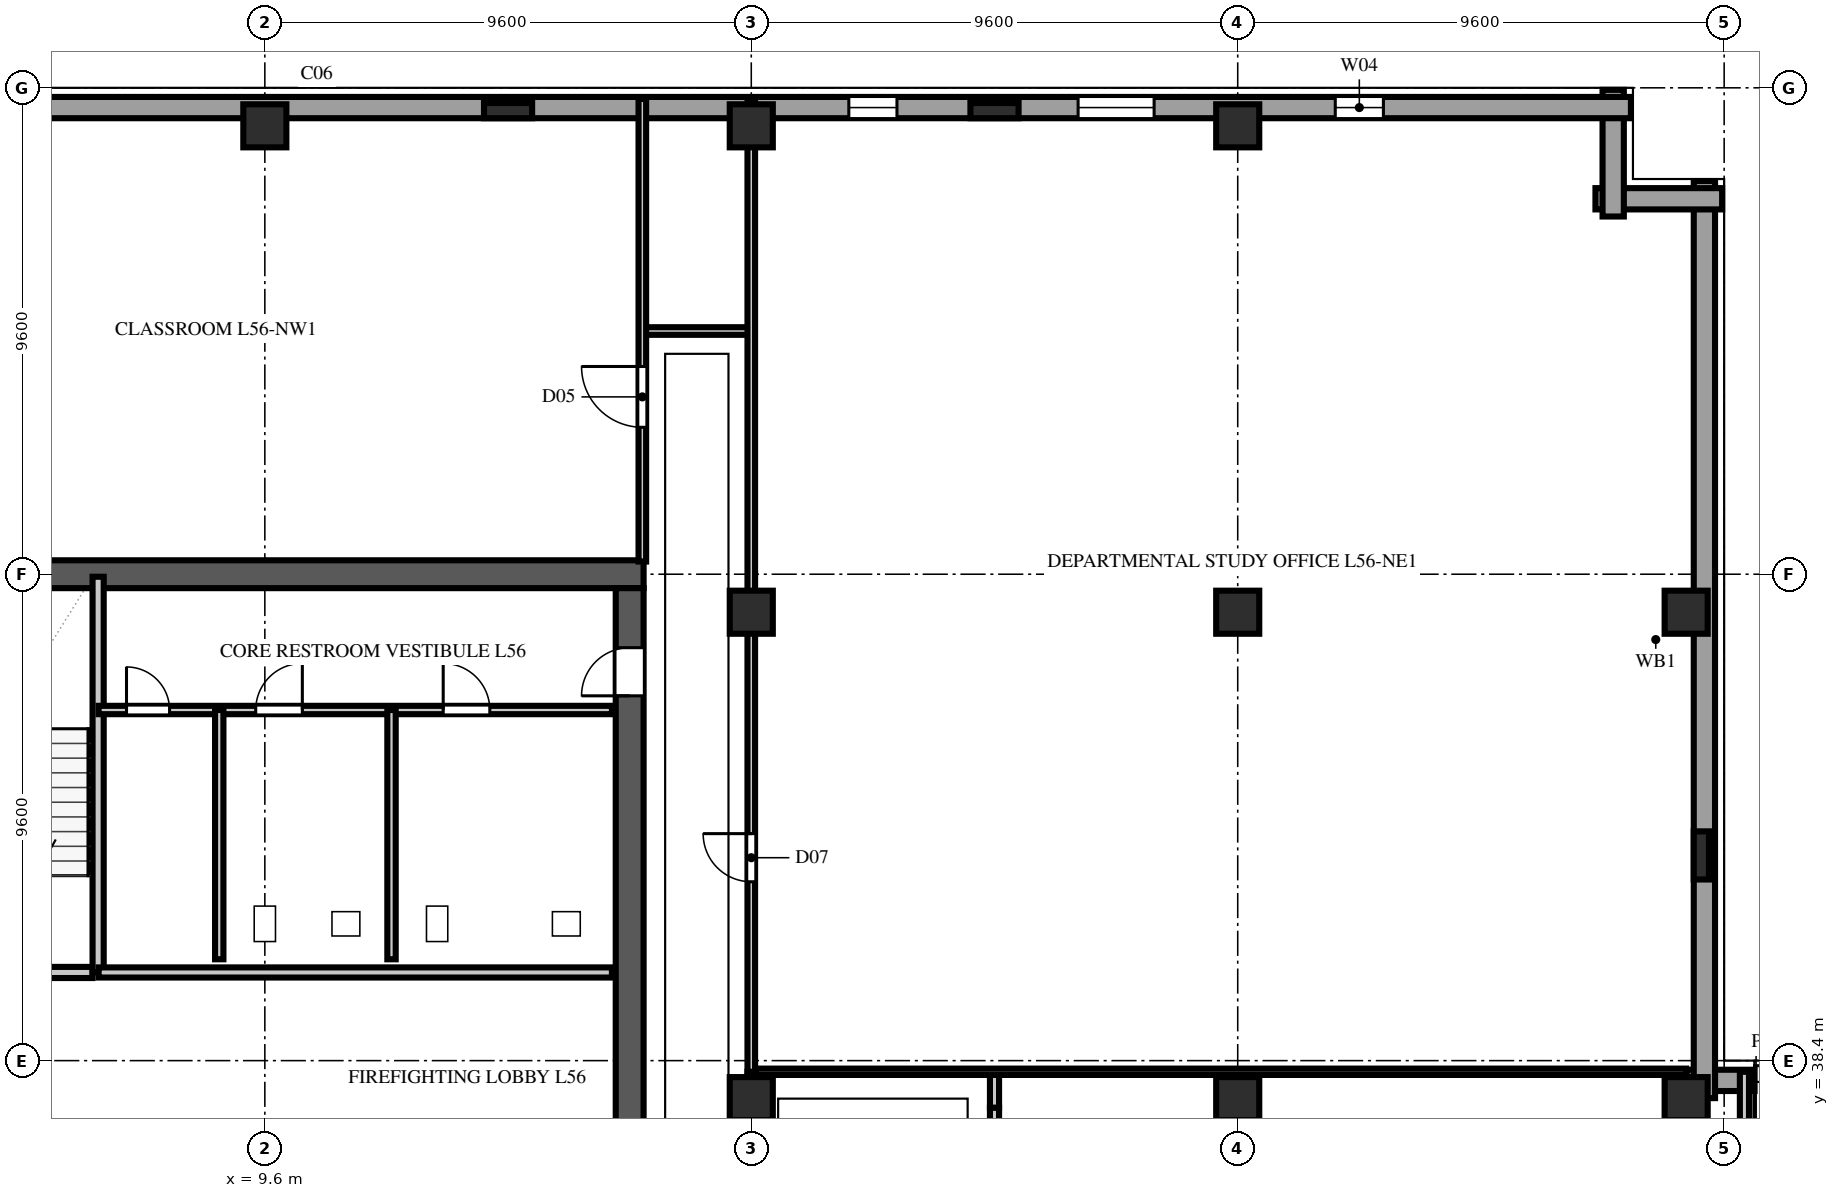
"""IFC4 building model, lengths in metres.
Left out: names, types, materials, properties, quantities, classifications, styles, units other than length and angle.
Written with IfcOpenShell. Run it as: python <this file> out.ifc"""

import sys

from ifc_helpers import new_model, si_unit, direction, frame, frame_2d, origin, origin_2d, place, context, subcontext, project, spatial, rectangle, extrude, element, fill, save


model = new_model("IFC4")
c1 = context("Model", 3, precision=1e-05, world=origin(), true_north=direction((0.0, 1.0)))
c2 = subcontext(c1, "Body", "Model", "MODEL_VIEW")
j1 = project(units=[si_unit("LENGTHUNIT", "METRE"), si_unit("PLANEANGLEUNIT", "RADIAN")], contexts=[c1])
p1 = place(None, origin())
s1 = spatial("IfcSite", under=j1, at=p1, CompositionType="ELEMENT")
p2 = place(p1, origin())
s2 = spatial("IfcBuilding", under=s1, at=p2, CompositionType="ELEMENT")
p3 = place(p2, frame((0.0, 0.0, 221.8)))
s3 = spatial("IfcBuildingStorey", under=s2, at=p3, CompositionType="ELEMENT", Elevation=221.8)
p4 = place(p3, frame((2.475, 48.0, 0.0), z_axis=(0.0, 0.0, 1.0), x_axis=(1.0, 0.0, 0.0)))
e1 = element("IfcWall", 1, at=p4, inside=s3, PredefinedType="SHEAR", context=c2, shape_type="SweptSolid", body=[
    extrude(rectangle(XDim=14.6, YDim=0.55, at=frame_2d((7.3, 0.0))), origin(), (0.0, 0.0, 1.0), 3.54),
])
p5 = place(p3, frame((16.8, 36.4, 0.0), z_axis=(0.0, 0.0, 1.0), x_axis=(0.0, 1.0, 0.0)))
e2 = element("IfcWall", 2, at=p5, inside=s3, PredefinedType="SHEAR", context=c2, shape_type="SweptSolid", body=[
    extrude(rectangle(XDim=11.325, YDim=0.55, at=frame_2d((5.663, 0.0))), origin(), (0.0, 0.0, 1.0), 3.54),
])
p6 = place(p5, frame((9.2, 0.0, 0.0)))
e3 = element("IfcOpeningElement", 3, at=p6, cuts=e2, PredefinedType="OPENING", context=c2, shape_type="SweptSolid", body=[
    extrude(rectangle(XDim=0.95, YDim=2.15, at=frame_2d((0.475, 1.075))), frame((0.0, 0.287, 0.0), z_axis=(0.0, -1.0, 0.0), x_axis=(1.0, 0.0, 0.0)), (0.0, 0.0, 1.0), 0.574),
])
for number, where, z_axis, x_axis in (
    (4, (9.6, 56.85, 0.0), (0.0, 0.0, 1.0), (1.0, 0.0, 0.0)),
    (5, (19.2, 37.65, 0.0), (0.0, 0.0, 1.0), (1.0, 0.0, 0.0)),
    (6, (19.2, 47.25, 0.0), (0.0, 0.0, 1.0), (1.0, 0.0, 0.0)),
    (7, (19.2, 56.85, 0.0), (0.0, 0.0, 1.0), (1.0, 0.0, 0.0)),
    (8, (28.8, 37.65, 0.0), (0.0, 0.0, 1.0), (1.0, 0.0, 0.0)),
    (9, (28.8, 47.25, 0.0), (0.0, 0.0, 1.0), (1.0, 0.0, 0.0)),
    (10, (28.8, 56.85, 0.0), (0.0, 0.0, 1.0), (1.0, 0.0, 0.0)),
    (11, (37.65, 37.65, 0.0), (0.0, 0.0, 1.0), (1.0, 0.0, 0.0)),
    (12, (37.65, 47.25, 0.0), (0.0, 0.0, 1.0), (1.0, 0.0, 0.0)),
):
    element("IfcColumn", number, at=place(p3, frame(where, z_axis=z_axis, x_axis=x_axis)), inside=s3, PredefinedType="COLUMN", context=c2, shape_type="SweptSolid", body=[
        extrude(rectangle(XDim=0.85, YDim=0.85, at=origin_2d()), origin(), (0.0, 0.0, 1.0), 3.8),
    ])
for number, where, z_axis, x_axis in (
    (13, (14.4, 57.15, 0.0), (0.0, 0.0, 1.0), (1.0, 0.0, 0.0)),
    (14, (24.0, 57.15, 0.0), (0.0, 0.0, 1.0), (1.0, 0.0, 0.0)),
    (15, (37.95, 42.45, 0.0), (0.0, 0.0, 1.0), (0.0, 1.0, 0.0)),
):
    element("IfcColumn", number, at=place(p3, frame(where, z_axis=z_axis, x_axis=x_axis)), inside=s3, PredefinedType="PILASTER", context=c2, shape_type="SweptSolid", body=[
        extrude(rectangle(XDim=0.95, YDim=0.3, at=origin_2d()), origin(), (0.0, 0.0, 1.0), 3.8),
    ])
p7 = place(p3, frame((39.0, 38.01, 0.0), z_axis=(0.0, 0.0, 1.0), x_axis=(-1.0, 0.0, 0.0)))
e16 = element("IfcWall", 16, at=p7, inside=s3, PredefinedType="SOLIDWALL", context=c2, shape_type="SweptSolid", body=[
    extrude(rectangle(XDim=1.34, YDim=0.42, at=frame_2d((0.67, 0.0))), origin(), (0.0, 0.0, 1.0), 3.54),
])
p8 = place(p3, frame((38.01, 37.66, 0.0), z_axis=(0.0, 0.0, 1.0), x_axis=(0.0, 1.0, 0.0)))
e17 = element("IfcWall", 17, at=p8, inside=s3, PredefinedType="SOLIDWALL", context=c2, shape_type="SweptSolid", body=[
    extrude(rectangle(XDim=18.1, YDim=0.42, at=frame_2d((9.05, 0.0))), origin(), (0.0, 0.0, 1.0), 3.54),
])
for number, where, z_axis, x_axis in (
    (18, (38.36, 55.41, 0.0), (0.0, 0.0, 1.0), (-1.0, 0.0, 0.0)),
    (19, (36.21, 55.06, 0.0), (0.0, 0.0, 1.0), (0.0, 1.0, 0.0)),
):
    element("IfcWall", number, at=place(p3, frame(where, z_axis=z_axis, x_axis=x_axis)), inside=s3, PredefinedType="SOLIDWALL", context=c2, shape_type="SweptSolid", body=[
        extrude(rectangle(XDim=2.5, YDim=0.42, at=frame_2d((1.25, 0.0))), origin(), (0.0, 0.0, 1.0), 3.54),
    ])
p9 = place(p3, frame((36.56, 57.21, 0.0), z_axis=(0.0, 0.0, 1.0), x_axis=(-1.0, 0.0, 0.0)))
e20 = element("IfcWall", 20, at=p9, inside=s3, PredefinedType="SOLIDWALL", context=c2, shape_type="SweptSolid", body=[
    extrude(rectangle(XDim=34.72, YDim=0.42, at=frame_2d((17.36, 0.0))), origin(), (0.0, 0.0, 1.0), 3.54),
])
p10 = place(p9, frame((4.885, 0.0, 0.9)))
e21 = element("IfcOpeningElement", 21, at=p10, cuts=e20, PredefinedType="OPENING", context=c2, shape_type="SweptSolid", body=[
    extrude(rectangle(XDim=0.95, YDim=1.85, at=frame_2d((0.475, 0.925))), frame((0.0, 0.222, 0.0), z_axis=(0.0, -1.0, 0.0), x_axis=(1.0, 0.0, 0.0)), (0.0, 0.0, 1.0), 0.444),
])
p11 = place(p9, frame((9.41, 0.0, 0.9)))
e22 = element("IfcOpeningElement", 22, at=p11, cuts=e20, PredefinedType="OPENING", context=c2, shape_type="SweptSolid", body=[
    extrude(rectangle(XDim=1.5, YDim=1.85, at=frame_2d((0.75, 0.925))), frame((0.0, 0.222, 0.0), z_axis=(0.0, -1.0, 0.0), x_axis=(1.0, 0.0, 0.0)), (0.0, 0.0, 1.0), 0.444),
])
p12 = place(p9, frame((14.485, 0.0, 0.9)))
e23 = element("IfcOpeningElement", 23, at=p12, cuts=e20, PredefinedType="OPENING", context=c2, shape_type="SweptSolid", body=[
    extrude(rectangle(XDim=0.95, YDim=1.85, at=frame_2d((0.475, 0.925))), frame((0.0, 0.222, 0.0), z_axis=(0.0, -1.0, 0.0), x_axis=(1.0, 0.0, 0.0)), (0.0, 0.0, 1.0), 0.444),
])
p13 = place(p3, frame((2.65, 40.14, 0.0), z_axis=(0.0, 0.0, 1.0), x_axis=(1.0, 0.0, 0.0)))
e24 = element("IfcWall", 24, at=p13, inside=s3, PredefinedType="SOLIDWALL", context=c2, shape_type="SweptSolid", body=[
    extrude(rectangle(XDim=3.55, YDim=0.22, at=frame_2d((1.775, 0.0))), origin(), (0.0, 0.0, 1.0), 3.54),
])
p14 = place(p13, frame((1.2, 0.0, 0.0)))
e25 = element("IfcOpeningElement", 25, at=p14, cuts=e24, PredefinedType="OPENING", context=c2, shape_type="SweptSolid", body=[
    extrude(rectangle(XDim=1.1, YDim=2.2, at=frame_2d((0.55, 1.1))), frame((0.0, 0.122, 0.0), z_axis=(0.0, -1.0, 0.0), x_axis=(1.0, 0.0, 0.0)), (0.0, 0.0, 1.0), 0.244),
])
p15 = place(p3, frame((6.31, 40.14, 0.0), z_axis=(0.0, 0.0, 1.0), x_axis=(0.0, 1.0, 0.0)))
e26 = element("IfcWall", 26, at=p15, inside=s3, PredefinedType="SOLIDWALL", context=c2, shape_type="SweptSolid", body=[
    extrude(rectangle(XDim=7.81, YDim=0.22, at=frame_2d((3.905, 0.0))), origin(), (0.0, 0.0, 1.0), 3.54),
])
p16 = place(p3, frame((6.32, 40.14, 0.0), z_axis=(0.0, 0.0, 1.0), x_axis=(1.0, 0.0, 0.0)))
e27 = element("IfcWall", 27, at=p16, inside=s3, PredefinedType="SOLIDWALL", context=c2, shape_type="SweptSolid", body=[
    extrude(rectangle(XDim=10.13, YDim=0.2, at=frame_2d((5.065, 0.0))), origin(), (0.0, 0.0, 1.0), 3.54),
])
p17 = place(p3, frame((6.32, 45.32, 0.0), z_axis=(0.0, 0.0, 1.0), x_axis=(1.0, 0.0, 0.0)))
e28 = element("IfcWall", 28, at=p17, inside=s3, PredefinedType="PLUMBINGWALL", context=c2, shape_type="SweptSolid", body=[
    extrude(rectangle(XDim=10.13, YDim=0.165, at=frame_2d((5.065, 0.0))), origin(), (0.0, 0.0, 1.0), 3.54),
])
p18 = place(p17, frame((0.55, 0.0, 0.0)))
e29 = element("IfcOpeningElement", 29, at=p18, cuts=e28, PredefinedType="OPENING", context=c2, shape_type="SweptSolid", body=[
    extrude(rectangle(XDim=0.85, YDim=2.1, at=frame_2d((0.425, 1.05))), frame((0.0, 0.094, 0.0), z_axis=(0.0, -1.0, 0.0), x_axis=(1.0, 0.0, 0.0)), (0.0, 0.0, 1.0), 0.189),
])
p19 = place(p17, frame((3.1, 0.0, 0.0)))
e30 = element("IfcOpeningElement", 30, at=p19, cuts=e28, PredefinedType="OPENING", context=c2, shape_type="SweptSolid", body=[
    extrude(rectangle(XDim=0.92, YDim=2.15, at=frame_2d((0.46, 1.075))), frame((0.0, 0.094, 0.0), z_axis=(0.0, -1.0, 0.0), x_axis=(1.0, 0.0, 0.0)), (0.0, 0.0, 1.0), 0.189),
])
p20 = place(p17, frame((6.8, 0.0, 0.0)))
e31 = element("IfcOpeningElement", 31, at=p20, cuts=e28, PredefinedType="OPENING", context=c2, shape_type="SweptSolid", body=[
    extrude(rectangle(XDim=0.92, YDim=2.15, at=frame_2d((0.46, 1.075))), frame((0.0, 0.094, 0.0), z_axis=(0.0, -1.0, 0.0), x_axis=(1.0, 0.0, 0.0)), (0.0, 0.0, 1.0), 0.189),
])
for number, where, z_axis, x_axis in (
    (32, (8.7, 40.4, 0.0), (0.0, 0.0, 1.0), (0.0, 1.0, 0.0)),
    (33, (12.1, 40.4, 0.0), (0.0, 0.0, 1.0), (0.0, 1.0, 0.0)),
):
    element("IfcWall", number, at=place(p3, frame(where, z_axis=z_axis, x_axis=x_axis)), inside=s3, PredefinedType="PLUMBINGWALL", context=c2, shape_type="SweptSolid", body=[
        extrude(rectangle(XDim=4.92, YDim=0.165, at=frame_2d((2.46, 0.0))), origin(), (0.0, 0.0, 1.0), 3.54),
    ])
p21 = place(p3, frame((17.05, 52.8, 0.0), z_axis=(0.0, 0.0, 1.0), x_axis=(1.0, 0.0, 0.0)))
e34 = element("IfcWall", 34, at=p21, inside=s3, PredefinedType="PARTITIONING", context=c2, shape_type="SweptSolid", body=[
    extrude(rectangle(XDim=2.15, YDim=0.15, at=frame_2d((1.075, 0.0))), origin(), (0.0, 0.0, 1.0), 3.54),
])
p22 = place(p3, frame((24.0, 28.978, 0.0), z_axis=(0.0, 0.0, 1.0), x_axis=(0.0, 1.0, 0.0)))
e35 = element("IfcWall", 35, at=p22, inside=s3, PredefinedType="PARTITIONING", context=c2, shape_type="SweptSolid", body=[
    extrude(rectangle(XDim=8.495, YDim=0.18, at=frame_2d((4.248, 0.0))), origin(), (0.0, 0.0, 1.0), 2.996),
])
p23 = place(p3, frame((24.0, 37.472, 0.0), z_axis=(0.0, 0.0, 1.0), x_axis=(0.0, 1.0, 0.0)))
e36 = element("IfcWall", 36, at=p23, inside=s3, PredefinedType="PARTITIONING", context=c2, shape_type="SweptSolid", body=[
    extrude(rectangle(XDim=0.708, YDim=0.18, at=frame_2d((0.354, 0.0))), origin(), (0.0, 0.0, 1.0), 3.54),
])
p24 = place(p3, frame((38.8, 23.9, 0.0), z_axis=(0.0, 0.0, 1.0), x_axis=(0.0, 1.0, 0.0)))
e37 = element("IfcWall", 37, at=p24, inside=s3, PredefinedType="PARTITIONING", context=c2, shape_type="SweptSolid", body=[
    extrude(rectangle(XDim=14.28, YDim=0.18, at=frame_2d((7.14, 0.0))), origin(), (0.0, 0.0, 1.0), 3.54),
])
p25 = place(p3, frame((19.2, 23.9, 0.0), z_axis=(0.0, 0.0, 1.0), x_axis=(0.0, 1.0, 0.0)))
e38 = element("IfcWall", 38, at=p25, inside=s3, PredefinedType="PARTITIONING", context=c2, shape_type="SweptSolid", body=[
    extrude(rectangle(XDim=14.28, YDim=0.15, at=frame_2d((7.14, 0.0))), origin(), (0.0, 0.0, 1.0), 2.845),
])
p26 = place(p3, frame((19.28, 38.18, 0.0), z_axis=(0.0, 0.0, 1.0), x_axis=(1.0, 0.0, 0.0)))
e39 = element("IfcWall", 39, at=p26, inside=s3, PredefinedType="PARTITIONING", context=c2, shape_type="SweptSolid", body=[
    extrude(rectangle(XDim=18.37, YDim=0.125, at=frame_2d((9.185, 0.0))), origin(), (0.0, 0.0, 1.0), 3.54),
])
p27 = place(p3, frame((19.2, 38.18, 0.0), z_axis=(0.0, 0.0, 1.0), x_axis=(0.0, 1.0, 0.0)))
e40 = element("IfcWall", 40, at=p27, inside=s3, PredefinedType="PARTITIONING", context=c2, shape_type="SweptSolid", body=[
    extrude(rectangle(XDim=18.67, YDim=0.15, at=frame_2d((9.335, 0.0))), origin(), (0.0, 0.0, 1.0), 2.845),
])
p28 = place(p27, frame((3.75, 0.0, 0.0)))
e41 = element("IfcOpeningElement", 41, at=p28, cuts=e40, PredefinedType="OPENING", context=c2, shape_type="SweptSolid", body=[
    extrude(rectangle(XDim=0.95, YDim=2.15, at=frame_2d((0.475, 1.075))), frame((0.0, 0.087, 0.0), z_axis=(0.0, -1.0, 0.0), x_axis=(1.0, 0.0, 0.0)), (0.0, 0.0, 1.0), 0.174),
])
p29 = place(p3, frame((19.2, 56.85, 0.0), z_axis=(0.0, 0.0, 1.0), x_axis=(0.0, 1.0, 0.0)))
e42 = element("IfcWall", 42, at=p29, inside=s3, PredefinedType="PARTITIONING", context=c2, shape_type="SweptSolid", body=[
    extrude(rectangle(XDim=0.53, YDim=0.15, at=frame_2d((0.265, 0.0))), origin(), (0.0, 0.0, 1.0), 3.54),
])
p30 = place(p3, frame((17.05, 48.25, 0.0), z_axis=(0.0, 0.0, 1.0), x_axis=(0.0, 1.0, 0.0)))
e43 = element("IfcWall", 43, at=p30, inside=s3, PredefinedType="PARTITIONING", context=c2, shape_type="SweptSolid", body=[
    extrude(rectangle(XDim=9.13, YDim=0.15, at=frame_2d((4.565, 0.0))), origin(), (0.0, 0.0, 1.0), 3.54),
])
p31 = place(p30, frame((2.65, 0.0, 0.0)))
e44 = element("IfcOpeningElement", 44, at=p31, cuts=e43, PredefinedType="OPENING", context=c2, shape_type="SweptSolid", body=[
    extrude(rectangle(XDim=1.2, YDim=2.2, at=frame_2d((0.6, 1.1))), frame((0.0, 0.087, 0.0), z_axis=(0.0, -1.0, 0.0), x_axis=(1.0, 0.0, 0.0)), (0.0, 0.0, 1.0), 0.174),
])
p32 = place(p10, origin())
e45 = element("IfcWindow", 45, at=p32, inside=s3, PartitioningType="SINGLE_PANEL", PredefinedType="WINDOW", context=c2, shape_type="SweptSolid", body=[
    extrude(rectangle(XDim=0.95, YDim=1.85, at=frame_2d((0.475, 0.925))), frame((0.0, 0.11, 0.0), z_axis=(0.0, -1.0, 0.0), x_axis=(1.0, 0.0, 0.0)), (0.0, 0.0, 1.0), 0.06),
])
fill(e21, e45)
p33 = place(p11, origin())
e46 = element("IfcWindow", 46, at=p33, inside=s3, PartitioningType="DOUBLE_PANEL_VERTICAL", PredefinedType="WINDOW", context=c2, shape_type="SweptSolid", body=[
    extrude(rectangle(XDim=1.5, YDim=1.85, at=frame_2d((0.75, 0.925))), frame((0.0, 0.11, 0.0), z_axis=(0.0, -1.0, 0.0), x_axis=(1.0, 0.0, 0.0)), (0.0, 0.0, 1.0), 0.06),
])
fill(e22, e46)
p34 = place(p12, origin())
e47 = element("IfcWindow", 47, at=p34, inside=s3, PartitioningType="SINGLE_PANEL", PredefinedType="WINDOW", context=c2, shape_type="SweptSolid", body=[
    extrude(rectangle(XDim=0.95, YDim=1.85, at=frame_2d((0.475, 0.925))), frame((0.0, 0.11, 0.0), z_axis=(0.0, -1.0, 0.0), x_axis=(1.0, 0.0, 0.0)), (0.0, 0.0, 1.0), 0.06),
])
fill(e23, e47)
p35 = place(p6, origin())
e48 = element("IfcDoor", 48, at=p35, inside=s3, OperationType="SINGLE_SWING_LEFT", PredefinedType="DOOR", context=c2, shape_type="SweptSolid", body=[
    extrude(rectangle(XDim=0.95, YDim=2.15, at=frame_2d((0.475, 1.075))), frame((0.0, 0.025, 0.0), z_axis=(0.0, -1.0, 0.0), x_axis=(1.0, 0.0, 0.0)), (0.0, 0.0, 1.0), 0.05),
])
fill(e3, e48)
p36 = place(p18, origin())
e49 = element("IfcDoor", 49, at=p36, inside=s3, OperationType="SINGLE_SWING_LEFT", PredefinedType="DOOR", context=c2, shape_type="SweptSolid", body=[
    extrude(rectangle(XDim=0.85, YDim=2.1, at=frame_2d((0.425, 1.05))), frame((0.0, 0.025, 0.0), z_axis=(0.0, -1.0, 0.0), x_axis=(1.0, 0.0, 0.0)), (0.0, 0.0, 1.0), 0.05),
])
fill(e29, e49)
p37 = place(p19, origin())
e50 = element("IfcDoor", 50, at=p37, inside=s3, OperationType="SINGLE_SWING_RIGHT", PredefinedType="DOOR", context=c2, shape_type="SweptSolid", body=[
    extrude(rectangle(XDim=0.92, YDim=2.15, at=frame_2d((0.46, 1.075))), frame((0.0, 0.025, 0.0), z_axis=(0.0, -1.0, 0.0), x_axis=(1.0, 0.0, 0.0)), (0.0, 0.0, 1.0), 0.05),
])
fill(e30, e50)
p38 = place(p20, origin())
e51 = element("IfcDoor", 51, at=p38, inside=s3, OperationType="SINGLE_SWING_LEFT", PredefinedType="DOOR", context=c2, shape_type="SweptSolid", body=[
    extrude(rectangle(XDim=0.92, YDim=2.15, at=frame_2d((0.46, 1.075))), frame((0.0, 0.025, 0.0), z_axis=(0.0, -1.0, 0.0), x_axis=(1.0, 0.0, 0.0)), (0.0, 0.0, 1.0), 0.05),
])
fill(e31, e51)
p39 = place(p28, origin())
e52 = element("IfcDoor", 52, at=p39, inside=s3, OperationType="SINGLE_SWING_RIGHT", PredefinedType="DOOR", context=c2, shape_type="SweptSolid", body=[
    extrude(rectangle(XDim=0.95, YDim=2.15, at=frame_2d((0.475, 1.075))), frame((0.0, 0.025, 0.0), z_axis=(0.0, -1.0, 0.0), x_axis=(1.0, 0.0, 0.0)), (0.0, 0.0, 1.0), 0.05),
])
fill(e41, e52)
p40 = place(p31, origin())
e53 = element("IfcDoor", 53, at=p40, inside=s3, OperationType="SINGLE_SWING_RIGHT", PredefinedType="DOOR", context=c2, shape_type="SweptSolid", body=[
    extrude(rectangle(XDim=1.2, YDim=2.2, at=frame_2d((0.6, 1.1))), frame((0.0, 0.025, 0.0), z_axis=(0.0, -1.0, 0.0), x_axis=(1.0, 0.0, 0.0)), (0.0, 0.0, 1.0), 0.05),
])
fill(e44, e53)
save(model, sys.argv[1])
